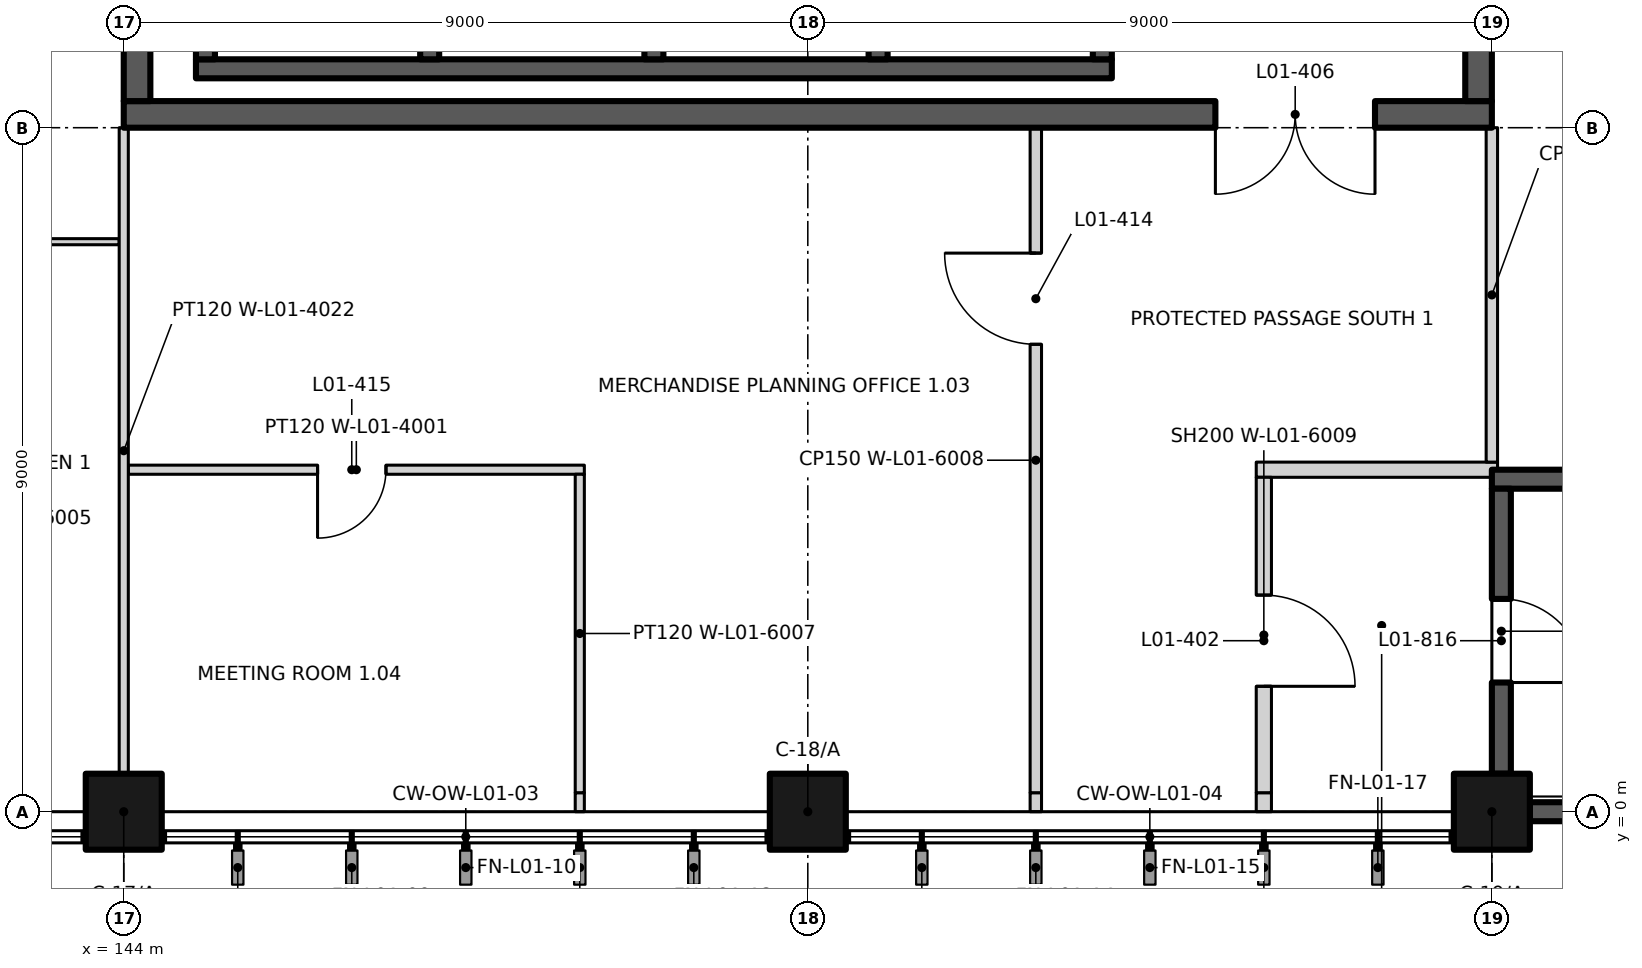
"""IFC4 building model, lengths in metres.
Left out: names, types, materials, properties, quantities, classifications, styles, units other than length and angle.
Written with IfcOpenShell. Run it as: python <this file> out.ifc"""

import sys

from ifc_helpers import new_model, si_unit, direction, frame, frame_2d, origin, origin_2d, place, context, subcontext, project, spatial, rectangle, extrude, element, fill, save


model = new_model("IFC4")
c1 = context("Model", 3, precision=1e-05, world=origin(), true_north=direction((0.0, 1.0)))
c2 = subcontext(c1, "Body", "Model", "MODEL_VIEW")
j1 = project(units=[si_unit("LENGTHUNIT", "METRE"), si_unit("PLANEANGLEUNIT", "RADIAN")], contexts=[c1])
p1 = place(None, origin())
s1 = spatial("IfcSite", under=j1, at=p1, CompositionType="ELEMENT")
p2 = place(p1, origin())
s2 = spatial("IfcBuilding", under=s1, at=p2, CompositionType="ELEMENT")
p3 = place(p2, frame((0.0, 0.0, 6.0)))
s3 = spatial("IfcBuildingStorey", under=s2, at=p3, CompositionType="ELEMENT", Elevation=6.0)
for number, where, z_axis, x_axis in (
    (1, (144.0, 0.0, 0.0), (0.0, 0.0, 1.0), (1.0, 0.0, 0.0)),
    (2, (153.0, 0.0, 0.0), (0.0, 0.0, 1.0), (1.0, 0.0, 0.0)),
    (3, (162.0, 0.0, 0.0), (0.0, 0.0, 1.0), (1.0, 0.0, 0.0)),
):
    element("IfcColumn", number, at=place(p3, frame(where, z_axis=z_axis, x_axis=x_axis)), inside=s3, PredefinedType="COLUMN", context=c2, shape_type="SweptSolid", body=[
        extrude(rectangle(XDim=1.0, YDim=1.0, at=origin_2d()), origin(), (0.0, 0.0, 1.0), 4.5),
    ])
p4 = place(p3, frame((162.5, 0.0, 0.0), z_axis=(0.0, 0.0, 1.0), x_axis=(1.0, 0.0, 0.0)))
e4 = element("IfcWall", 4, at=p4, inside=s3, PredefinedType="SHEAR", context=c2, shape_type="SweptSolid", body=[
    extrude(rectangle(XDim=8.0, YDim=0.25, at=frame_2d((4.0, 0.0))), origin(), (0.0, 0.0, 1.0), 4.5),
])
p5 = place(p3, frame((162.0, 4.375, 0.0), z_axis=(0.0, 0.0, 1.0), x_axis=(1.0, 0.0, 0.0)))
e5 = element("IfcWall", 5, at=p5, inside=s3, PredefinedType="SHEAR", context=c2, shape_type="SweptSolid", body=[
    extrude(rectangle(XDim=9.0, YDim=0.25, at=frame_2d((4.5, 0.0))), origin(), (0.0, 0.0, 1.0), 4.5),
])
p6 = place(p3, frame((162.125, 0.5, 0.0), z_axis=(0.0, 0.0, 1.0), x_axis=(0.0, 1.0, 0.0)))
e6 = element("IfcWall", 6, at=p6, inside=s3, PredefinedType="SHEAR", context=c2, shape_type="SweptSolid", body=[
    extrude(rectangle(XDim=3.75, YDim=0.25, at=frame_2d((1.875, 0.0))), origin(), (0.0, 0.0, 1.0), 4.5),
])
p7 = place(p6, frame((2.3, 0.0, 0.0), z_axis=(0.0, 0.0, 1.0), x_axis=(-1.0, 0.0, 0.0)))
e7 = element("IfcOpeningElement", 7, at=p7, cuts=e6, PredefinedType="OPENING", context=c2, shape_type="SweptSolid", body=[
    extrude(rectangle(XDim=1.1, YDim=2.1, at=frame_2d((0.55, 1.05))), frame((0.0, 0.135, 0.0), z_axis=(0.0, -1.0, 0.0), x_axis=(1.0, 0.0, 0.0)), (0.0, 0.0, 1.0), 0.27),
])
p8 = place(p3, frame((144.95, 9.775, 0.0), z_axis=(0.0, 0.0, 1.0), x_axis=(1.0, 0.0, 0.0)))
e8 = element("IfcWall", 8, at=p8, inside=s3, PredefinedType="SHEAR", context=c2, shape_type="SweptSolid", body=[
    extrude(rectangle(XDim=12.05, YDim=0.25, at=frame_2d((6.025, 0.0))), origin(), (0.0, 0.0, 1.0), 4.5),
])
for number, where, z_axis, x_axis in (
    (9, (145.075, 9.9, 0.0), (0.0, 0.0, 1.0), (0.0, 1.0, 0.0)),
    (10, (148.025, 9.9, 0.0), (0.0, 0.0, 1.0), (0.0, 1.0, 0.0)),
    (11, (150.975, 9.9, 0.0), (0.0, 0.0, 1.0), (0.0, 1.0, 0.0)),
    (12, (153.925, 9.9, 0.0), (0.0, 0.0, 1.0), (0.0, 1.0, 0.0)),
    (13, (156.875, 9.9, 0.0), (0.0, 0.0, 1.0), (0.0, 1.0, 0.0)),
):
    element("IfcWall", number, at=place(p3, frame(where, z_axis=z_axis, x_axis=x_axis)), inside=s3, PredefinedType="SHEAR", context=c2, shape_type="SweptSolid", body=[
        extrude(rectangle(XDim=2.7, YDim=0.25, at=frame_2d((1.35, 0.0))), origin(), (0.0, 0.0, 1.0), 4.5),
    ])
p9 = place(p3, frame((144.06, 4.5, 0.0), z_axis=(0.0, 0.0, 1.0), x_axis=(1.0, 0.0, 0.0)))
e14 = element("IfcWall", 14, at=p9, inside=s3, PredefinedType="PARTITIONING", context=c2, shape_type="SweptSolid", body=[
    extrude(rectangle(XDim=6.0, YDim=0.12, at=frame_2d((3.0, 0.0))), origin(), (0.0, 0.0, 1.0), 4.2),
])
p10 = place(p9, frame((3.39, 0.0, 0.0), z_axis=(0.0, 0.0, 1.0), x_axis=(-1.0, 0.0, 0.0)))
e15 = element("IfcOpeningElement", 15, at=p10, cuts=e14, PredefinedType="OPENING", context=c2, shape_type="SweptSolid", body=[
    extrude(rectangle(XDim=0.9, YDim=2.1, at=frame_2d((0.45, 1.05))), frame((0.0, 0.07, 0.0), z_axis=(0.0, -1.0, 0.0), x_axis=(1.0, 0.0, 0.0)), (0.0, 0.0, 1.0), 0.14),
])
p11 = place(p3, frame((158.9, 4.5, 0.0), z_axis=(0.0, 0.0, 1.0), x_axis=(1.0, 0.0, 0.0)))
e16 = element("IfcWall", 16, at=p11, inside=s3, PredefinedType="PARTITIONING", context=c2, shape_type="SweptSolid", body=[
    extrude(rectangle(XDim=3.175, YDim=0.2, at=frame_2d((1.587, 0.0))), origin(), (0.0, 0.0, 1.0), 4.2),
])
p12 = place(p3, frame((135.06, 7.5, 0.0), z_axis=(0.0, 0.0, 1.0), x_axis=(1.0, 0.0, 0.0)))
e17 = element("IfcWall", 17, at=p12, inside=s3, PredefinedType="PARTITIONING", context=c2, shape_type="SweptSolid", body=[
    extrude(rectangle(XDim=8.88, YDim=0.08, at=frame_2d((4.44, 0.0))), origin(), (0.0, 0.0, 1.0), 4.2),
])
p13 = place(p12, frame((4.64, 0.0, 0.0), z_axis=(0.0, 0.0, 1.0), x_axis=(-1.0, 0.0, 0.0)))
e18 = element("IfcOpeningElement", 18, at=p13, cuts=e17, PredefinedType="OPENING", context=c2, shape_type="SweptSolid", body=[
    extrude(rectangle(XDim=0.9, YDim=2.1, at=frame_2d((0.45, 1.05))), frame((0.0, 0.05, 0.0), z_axis=(0.0, -1.0, 0.0), x_axis=(1.0, 0.0, 0.0)), (0.0, 0.0, 1.0), 0.1),
])
p14 = place(p12, frame((7.89, 0.0, 0.0), z_axis=(0.0, 0.0, 1.0), x_axis=(-1.0, 0.0, 0.0)))
e19 = element("IfcOpeningElement", 19, at=p14, cuts=e17, PredefinedType="OPENING", context=c2, shape_type="SweptSolid", body=[
    extrude(rectangle(XDim=0.9, YDim=2.1, at=frame_2d((0.45, 1.05))), frame((0.0, 0.05, 0.0), z_axis=(0.0, -1.0, 0.0), x_axis=(1.0, 0.0, 0.0)), (0.0, 0.0, 1.0), 0.1),
])
p15 = place(p3, frame((144.0, 9.175, 0.0), z_axis=(0.0, 0.0, 1.0), x_axis=(1.0, 0.0, 0.0)))
e20 = element("IfcWall", 20, at=p15, inside=s3, PredefinedType="SHEAR", context=c2, shape_type="SweptSolid", body=[
    extrude(rectangle(XDim=18.0, YDim=0.35, at=frame_2d((9.0, 0.0))), origin(), (0.0, 0.0, 1.0), 4.2),
])
p16 = place(p15, frame((16.463, 0.0, 0.0), z_axis=(0.0, 0.0, 1.0), x_axis=(-1.0, 0.0, 0.0)))
e21 = element("IfcOpeningElement", 21, at=p16, cuts=e20, PredefinedType="OPENING", context=c2, shape_type="SweptSolid", body=[
    extrude(rectangle(XDim=2.1, YDim=2.4, at=frame_2d((1.05, 1.2))), frame((0.0, 0.185, 0.0), z_axis=(0.0, -1.0, 0.0), x_axis=(1.0, 0.0, 0.0)), (0.0, 0.0, 1.0), 0.37),
])
p17 = place(p3, frame((144.0, 0.5, 0.0), z_axis=(0.0, 0.0, 1.0), x_axis=(0.0, 1.0, 0.0)))
e22 = element("IfcWall", 22, at=p17, inside=s3, PredefinedType="PARTITIONING", context=c2, shape_type="SweptSolid", body=[
    extrude(rectangle(XDim=8.5, YDim=0.12, at=frame_2d((4.25, 0.0))), origin(), (0.0, 0.0, 1.0), 4.2),
])
p18 = place(p3, frame((144.175, 9.35, 0.0), z_axis=(0.0, 0.0, 1.0), x_axis=(0.0, 1.0, 0.0)))
e23 = element("IfcWall", 23, at=p18, inside=s3, PredefinedType="SHEAR", context=c2, shape_type="SweptSolid", body=[
    extrude(rectangle(XDim=17.4, YDim=0.35, at=frame_2d((8.7, 0.0))), origin(), (0.0, 0.0, 1.0), 4.2),
])
p19 = place(p18, frame((3.75, 0.0, 0.0)))
e24 = element("IfcOpeningElement", 24, at=p19, cuts=e23, PredefinedType="OPENING", context=c2, shape_type="SweptSolid", body=[
    extrude(rectangle(XDim=1.6, YDim=2.4, at=frame_2d((0.8, 1.2))), frame((0.0, 0.185, 0.0), z_axis=(0.0, -1.0, 0.0), x_axis=(1.0, 0.0, 0.0)), (0.0, 0.0, 1.0), 0.37),
])
p20 = place(p3, frame((150.0, 0.0, 0.0), z_axis=(0.0, 0.0, 1.0), x_axis=(0.0, 1.0, 0.0)))
e25 = element("IfcWall", 25, at=p20, inside=s3, PredefinedType="PARTITIONING", context=c2, shape_type="SweptSolid", body=[
    extrude(rectangle(XDim=0.25, YDim=0.12, at=frame_2d((0.125, 0.0))), origin(), (0.0, 0.0, 1.0), 3.6),
])
p21 = place(p3, frame((150.0, 0.25, 0.0), z_axis=(0.0, 0.0, 1.0), x_axis=(0.0, 1.0, 0.0)))
e26 = element("IfcWall", 26, at=p21, inside=s3, PredefinedType="PARTITIONING", context=c2, shape_type="SweptSolid", body=[
    extrude(rectangle(XDim=4.19, YDim=0.12, at=frame_2d((2.095, 0.0))), origin(), (0.0, 0.0, 1.0), 4.2),
])
p22 = place(p3, frame((156.0, 0.0, 0.0), z_axis=(0.0, 0.0, 1.0), x_axis=(0.0, 1.0, 0.0)))
e27 = element("IfcWall", 27, at=p22, inside=s3, PredefinedType="PARTITIONING", context=c2, shape_type="SweptSolid", body=[
    extrude(rectangle(XDim=0.25, YDim=0.15, at=frame_2d((0.125, 0.0))), origin(), (0.0, 0.0, 1.0), 3.6),
])
p23 = place(p3, frame((156.0, 0.25, 0.0), z_axis=(0.0, 0.0, 1.0), x_axis=(0.0, 1.0, 0.0)))
e28 = element("IfcWall", 28, at=p23, inside=s3, PredefinedType="PARTITIONING", context=c2, shape_type="SweptSolid", body=[
    extrude(rectangle(XDim=8.75, YDim=0.15, at=frame_2d((4.375, 0.0))), origin(), (0.0, 0.0, 1.0), 4.2),
])
p24 = place(p23, frame((5.9, 0.0, 0.0)))
e29 = element("IfcOpeningElement", 29, at=p24, cuts=e28, PredefinedType="OPENING", context=c2, shape_type="SweptSolid", body=[
    extrude(rectangle(XDim=1.2, YDim=2.1, at=frame_2d((0.6, 1.05))), frame((0.0, 0.085, 0.0), z_axis=(0.0, -1.0, 0.0), x_axis=(1.0, 0.0, 0.0)), (0.0, 0.0, 1.0), 0.17),
])
p25 = place(p3, frame((159.0, 0.0, 0.0), z_axis=(0.0, 0.0, 1.0), x_axis=(0.0, 1.0, 0.0)))
e30 = element("IfcWall", 30, at=p25, inside=s3, PredefinedType="PARTITIONING", context=c2, shape_type="SweptSolid", body=[
    extrude(rectangle(XDim=0.25, YDim=0.2, at=frame_2d((0.125, 0.0))), origin(), (0.0, 0.0, 1.0), 3.6),
])
p26 = place(p3, frame((159.0, 0.25, 0.0), z_axis=(0.0, 0.0, 1.0), x_axis=(0.0, 1.0, 0.0)))
e31 = element("IfcWall", 31, at=p26, inside=s3, PredefinedType="PARTITIONING", context=c2, shape_type="SweptSolid", body=[
    extrude(rectangle(XDim=4.15, YDim=0.2, at=frame_2d((2.075, 0.0))), origin(), (0.0, 0.0, 1.0), 4.2),
])
p27 = place(p26, frame((2.6, 0.0, 0.0), z_axis=(0.0, 0.0, 1.0), x_axis=(-1.0, 0.0, 0.0)))
e32 = element("IfcOpeningElement", 32, at=p27, cuts=e31, PredefinedType="OPENING", context=c2, shape_type="SweptSolid", body=[
    extrude(rectangle(XDim=1.2, YDim=2.1, at=frame_2d((0.6, 1.05))), frame((0.0, 0.11, 0.0), z_axis=(0.0, -1.0, 0.0), x_axis=(1.0, 0.0, 0.0)), (0.0, 0.0, 1.0), 0.22),
])
p28 = place(p3, frame((161.825, 9.35, 0.0), z_axis=(0.0, 0.0, 1.0), x_axis=(0.0, 1.0, 0.0)))
e33 = element("IfcWall", 33, at=p28, inside=s3, PredefinedType="SHEAR", context=c2, shape_type="SweptSolid", body=[
    extrude(rectangle(XDim=17.4, YDim=0.35, at=frame_2d((8.7, 0.0))), origin(), (0.0, 0.0, 1.0), 4.2),
])
p29 = place(p28, frame((7.3, 0.0, 0.0), z_axis=(0.0, 0.0, 1.0), x_axis=(-1.0, 0.0, 0.0)))
e34 = element("IfcOpeningElement", 34, at=p29, cuts=e33, PredefinedType="OPENING", context=c2, shape_type="SweptSolid", body=[
    extrude(rectangle(XDim=1.8, YDim=2.4, at=frame_2d((0.9, 1.2))), frame((0.0, 0.185, 0.0), z_axis=(0.0, -1.0, 0.0), x_axis=(1.0, 0.0, 0.0)), (0.0, 0.0, 1.0), 0.37),
])
p30 = place(p3, frame((162.0, 4.6, 0.0), z_axis=(0.0, 0.0, 1.0), x_axis=(0.0, 1.0, 0.0)))
e35 = element("IfcWall", 35, at=p30, inside=s3, PredefinedType="PARTITIONING", context=c2, shape_type="SweptSolid", body=[
    extrude(rectangle(XDim=4.4, YDim=0.15, at=frame_2d((2.2, 0.0))), origin(), (0.0, 0.0, 1.0), 4.2),
])
p31 = place(p7, origin())
e36 = element("IfcDoor", 36, at=p31, inside=s3, OperationType="SINGLE_SWING_RIGHT", PredefinedType="DOOR", context=c2, shape_type="SweptSolid", body=[
    extrude(rectangle(XDim=1.1, YDim=2.1, at=frame_2d((0.55, 1.05))), frame((0.0, 0.025, 0.0), z_axis=(0.0, -1.0, 0.0), x_axis=(1.0, 0.0, 0.0)), (0.0, 0.0, 1.0), 0.05),
])
fill(e7, e36)
p32 = place(p27, origin())
e37 = element("IfcDoor", 37, at=p32, inside=s3, OperationType="SINGLE_SWING_RIGHT", PredefinedType="DOOR", context=c2, shape_type="SweptSolid", body=[
    extrude(rectangle(XDim=1.2, YDim=2.1, at=frame_2d((0.6, 1.05))), frame((0.0, 0.025, 0.0), z_axis=(0.0, -1.0, 0.0), x_axis=(1.0, 0.0, 0.0)), (0.0, 0.0, 1.0), 0.05),
])
fill(e32, e37)
p33 = place(p16, origin())
e38 = element("IfcDoor", 38, at=p33, inside=s3, OperationType="DOUBLE_DOOR_SINGLE_SWING", PredefinedType="DOOR", context=c2, shape_type="SweptSolid", body=[
    extrude(rectangle(XDim=2.1, YDim=2.4, at=frame_2d((1.05, 1.2))), frame((0.0, 0.025, 0.0), z_axis=(0.0, -1.0, 0.0), x_axis=(1.0, 0.0, 0.0)), (0.0, 0.0, 1.0), 0.05),
])
fill(e21, e38)
p34 = place(p24, origin())
e39 = element("IfcDoor", 39, at=p34, inside=s3, OperationType="SINGLE_SWING_RIGHT", PredefinedType="DOOR", context=c2, shape_type="SweptSolid", body=[
    extrude(rectangle(XDim=1.2, YDim=2.1, at=frame_2d((0.6, 1.05))), frame((0.0, 0.025, 0.0), z_axis=(0.0, -1.0, 0.0), x_axis=(1.0, 0.0, 0.0)), (0.0, 0.0, 1.0), 0.05),
])
fill(e29, e39)
p35 = place(p10, origin())
e40 = element("IfcDoor", 40, at=p35, inside=s3, OperationType="SINGLE_SWING_RIGHT", PredefinedType="DOOR", context=c2, shape_type="SweptSolid", body=[
    extrude(rectangle(XDim=0.9, YDim=2.1, at=frame_2d((0.45, 1.05))), frame((0.0, 0.025, 0.0), z_axis=(0.0, -1.0, 0.0), x_axis=(1.0, 0.0, 0.0)), (0.0, 0.0, 1.0), 0.05),
])
fill(e15, e40)
save(model, sys.argv[1])
